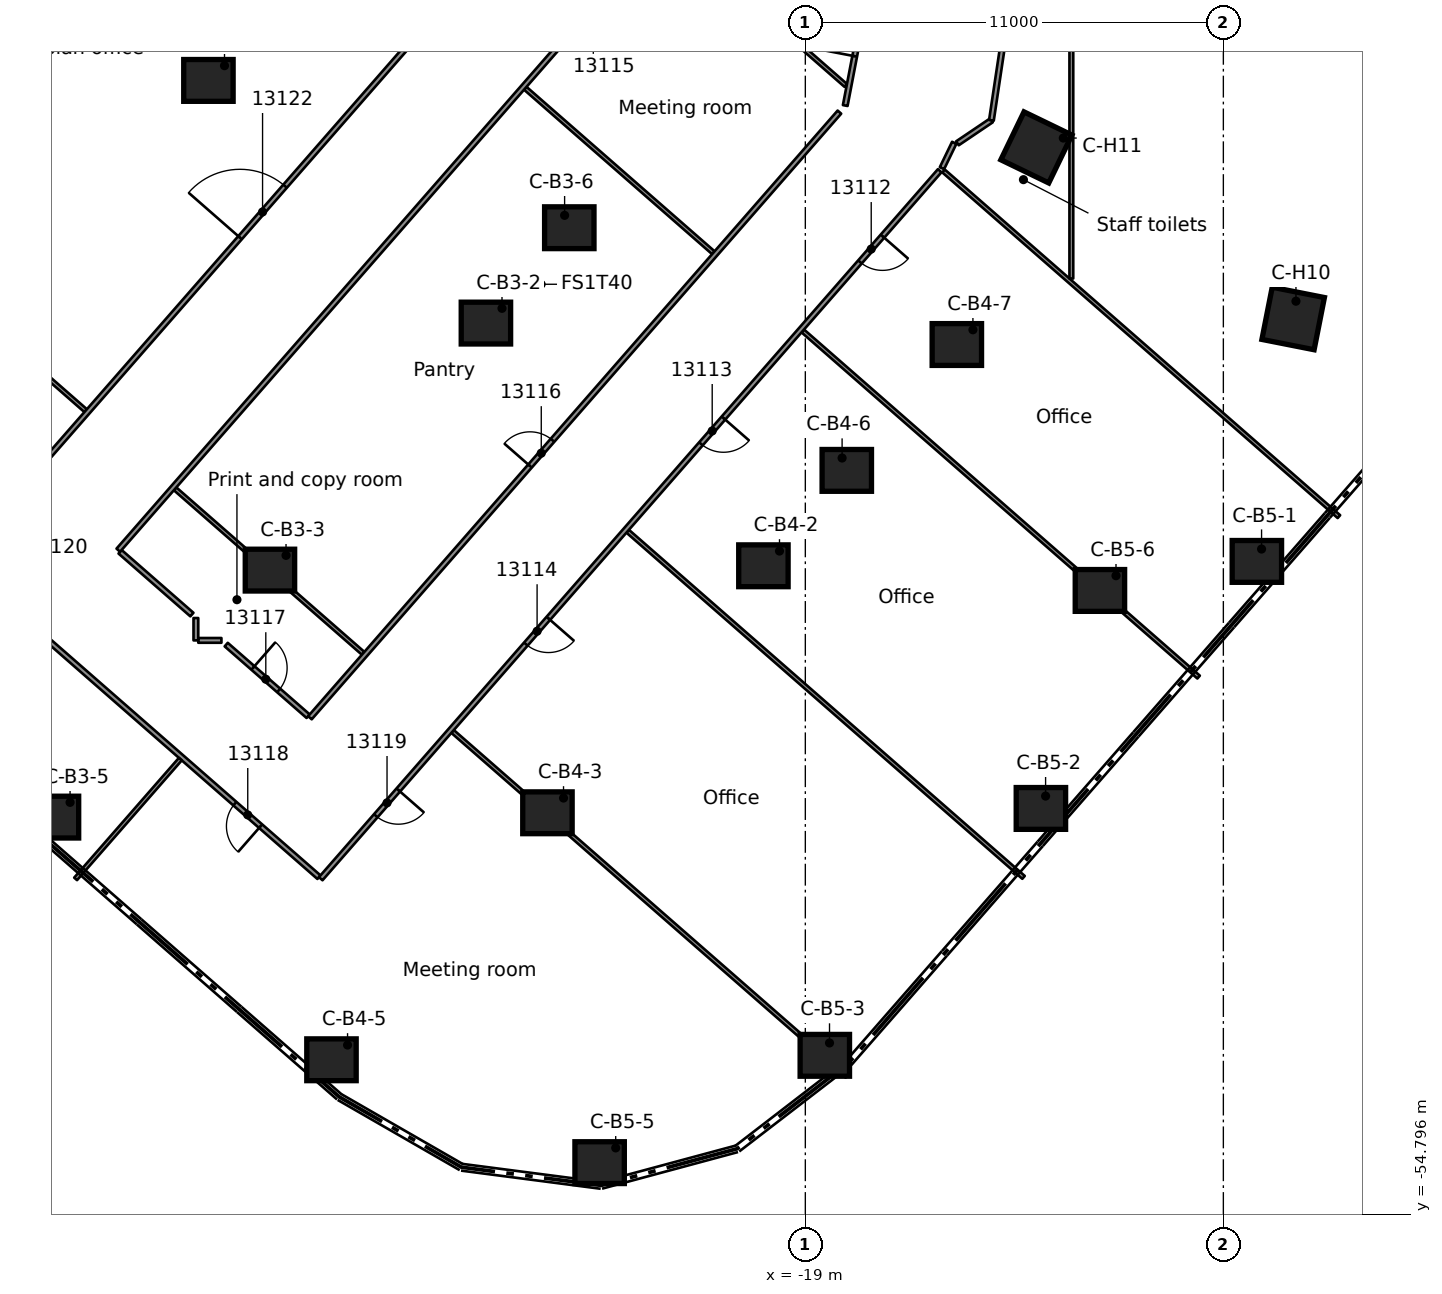
"""IFC4 building model, lengths in metres.
Left out: names, types, materials, properties, quantities, classifications, styles, units other than length and angle.
Written with IfcOpenShell. Run it as: python <this file> out.ifc"""

import sys

from ifc_helpers import new_model, si_unit, direction, frame, frame_2d, origin, origin_2d, place, context, subcontext, project, spatial, rectangle, extrude, element, fill, save


model = new_model("IFC4")
c1 = context("Model", 3, precision=1e-05, world=origin(), true_north=direction((0.0, 1.0)))
c2 = subcontext(c1, "Body", "Model", "MODEL_VIEW")
j1 = project(units=[si_unit("LENGTHUNIT", "METRE"), si_unit("PLANEANGLEUNIT", "RADIAN")], contexts=[c1])
p1 = place(None, origin())
s1 = spatial("IfcSite", under=j1, at=p1, CompositionType="ELEMENT")
p2 = place(p1, origin())
s2 = spatial("IfcBuilding", under=s1, at=p2, CompositionType="ELEMENT")
p3 = place(p2, frame((0.0, 0.0, 62.3)))
s3 = spatial("IfcBuildingStorey", under=s2, at=p3, CompositionType="ELEMENT", Elevation=62.3)
for number, where, z_axis, x_axis in (
    (1, (-34.707, -24.956, 0.0), (0.0, 0.0, 1.0), (1.0, 0.0, 0.0)),
    (2, (-27.405, -31.341, 0.0), (0.0, 0.0, 1.0), (1.0, 0.0, 0.0)),
    (3, (-33.088, -37.841, 0.0), (0.0, 0.0, 1.0), (1.0, 0.0, 0.0)),
    (4, (-38.771, -44.34, 0.0), (0.0, 0.0, 1.0), (1.0, 0.0, 0.0)),
    (5, (-25.211, -28.832, 0.0), (0.0, 0.0, 1.0), (1.0, 0.0, 0.0)),
    (6, (-20.103, -37.727, 0.0), (0.0, 0.0, 1.0), (1.0, 0.0, 0.0)),
    (7, (-25.786, -44.226, 0.0), (0.0, 0.0, 1.0), (1.0, 0.0, 0.0)),
    (8, (-31.469, -50.725, 0.0), (0.0, 0.0, 1.0), (1.0, 0.0, 0.0)),
    (9, (-17.909, -35.217, 0.0), (0.0, 0.0, 1.0), (1.0, 0.0, 0.0)),
    (10, (-15.013, -31.905, 0.0), (0.0, 0.0, 1.0), (1.0, 0.0, 0.0)),
    (11, (-7.118, -37.612, 0.0), (0.0, 0.0, 1.0), (1.0, 0.0, 0.0)),
    (12, (-12.801, -44.112, 0.0), (0.0, 0.0, 1.0), (1.0, 0.0, 0.0)),
    (13, (-18.487, -50.608, 0.0), (0.0, 0.0, 1.0), (1.0, 0.0, 0.0)),
    (14, (-24.413, -53.432, 0.0), (0.0, 0.0, 1.0), (1.0, 0.0, 0.0)),
    (15, (-11.248, -38.376, 0.0), (0.0, 0.0, 1.0), (1.0, 0.0, 0.0)),
):
    element("IfcColumn", number, at=place(p3, frame(where, z_axis=z_axis, x_axis=x_axis)), inside=s3, PredefinedType="COLUMN", context=c2, shape_type="SweptSolid", body=[
        extrude(rectangle(XDim=1.3, YDim=1.1, at=origin_2d()), origin(), (0.0, 0.0, 1.0), 3.5),
    ])
for number, where, z_axis, x_axis in (
    (16, (-6.163, -31.22, 0.0), (0.0, 0.0, 1.0), (-0.194, -0.981, 0.0)),
    (17, (-12.92, -26.719, 0.0), (0.0, 0.0, 1.0), (-0.435, -0.9, 0.0)),
):
    element("IfcColumn", number, at=place(p3, frame(where, z_axis=z_axis, x_axis=x_axis)), inside=s3, PredefinedType="COLUMN", context=c2, shape_type="SweptSolid", body=[
        extrude(rectangle(XDim=1.4, YDim=1.4, at=origin_2d()), origin(), (0.0, 0.0, 1.0), 3.5),
    ])
p4 = place(p3, frame((-31.798, -45.921, 0.0), z_axis=(0.0, 0.0, 1.0), x_axis=(-0.752771196542, 0.658282253792, 0.0)))
e18 = element("IfcWall", 18, at=p4, inside=s3, PredefinedType="PARTITIONING", context=c2, shape_type="SweptSolid", body=[
    extrude(rectangle(XDim=9.64, YDim=0.125, at=frame_2d((4.82, 0.0))), origin(), (0.0, 0.0, 1.0), 3.08),
])
p5 = place(p4, frame((2.04, 0.0, 0.0)))
e19 = element("IfcOpeningElement", 19, at=p5, cuts=e18, PredefinedType="OPENING", context=c2, shape_type="SweptSolid", body=[
    extrude(rectangle(XDim=0.9, YDim=2.1, at=frame_2d((0.45, 1.05))), frame((0.0, 0.073, 0.0), z_axis=(0.0, -1.0, 0.0), x_axis=(1.0, 0.0, 0.0)), (0.0, 0.0, 1.0), 0.145),
])
p6 = place(p3, frame((-37.032, -37.358, 0.0), z_axis=(0.0, 0.0, 1.0), x_axis=(0.752691127314, -0.658373804812, 0.0)))
e20 = element("IfcWall", 20, at=p6, inside=s3, PredefinedType="PARTITIONING", context=c2, shape_type="SweptSolid", body=[
    extrude(rectangle(XDim=2.511, YDim=0.125, at=frame_2d((1.255, 0.0))), origin(), (0.0, 0.0, 1.0), 3.08),
])
p7 = place(p3, frame((-34.239, -39.801, 0.0), z_axis=(0.0, 0.0, 1.0), x_axis=(0.753004386547, -0.658015496657, 0.0)))
e21 = element("IfcWall", 21, at=p7, inside=s3, PredefinedType="PARTITIONING", context=c2, shape_type="SweptSolid", body=[
    extrude(rectangle(XDim=2.863, YDim=0.125, at=frame_2d((1.432, 0.0))), origin(), (0.0, 0.0, 1.0), 3.08),
])
p8 = place(p7, frame((0.934, 0.0, 0.0)))
e22 = element("IfcOpeningElement", 22, at=p8, cuts=e21, PredefinedType="OPENING", context=c2, shape_type="SweptSolid", body=[
    extrude(rectangle(XDim=0.9, YDim=2.1, at=frame_2d((0.45, 1.05))), frame((0.0, 0.073, 0.0), z_axis=(0.0, -1.0, 0.0), x_axis=(1.0, 0.0, 0.0)), (0.0, 0.0, 1.0), 0.145),
])
p9 = place(p3, frame((-48.313, -24.572, 0.0), z_axis=(0.0, 0.0, 1.0), x_axis=(0.75276101301, -0.658293898872, 0.0)))
e23 = element("IfcWall", 23, at=p9, inside=s3, PredefinedType="PARTITIONING", context=c2, shape_type="SweptSolid", body=[
    extrude(rectangle(XDim=13.783, YDim=0.1, at=frame_2d((6.891, 0.0))), origin(), (0.0, 0.0, 1.0), 3.08),
])
p10 = place(p3, frame((-35.584, -35.702, 0.0), z_axis=(0.0, 0.0, 1.0), x_axis=(0.75268021229, -0.658386283292, 0.0)))
e24 = element("IfcWall", 24, at=p10, inside=s3, PredefinedType="PARTITIONING", context=c2, shape_type="SweptSolid", body=[
    extrude(rectangle(XDim=6.574, YDim=0.1, at=frame_2d((3.287, 0.0))), origin(), (0.0, 0.0, 1.0), 3.08),
])
p11 = place(p3, frame((-28.282, -42.087, 0.0), z_axis=(0.0, 0.0, 1.0), x_axis=(0.752796124803, -0.658253746272, 0.0)))
e25 = element("IfcWall", 25, at=p11, inside=s3, PredefinedType="PARTITIONING", context=c2, shape_type="SweptSolid", body=[
    extrude(rectangle(XDim=13.782, YDim=0.1, at=frame_2d((6.891, 0.0))), origin(), (0.0, 0.0, 1.0), 3.08),
])
p12 = place(p3, frame((-23.675, -36.818, 0.0), z_axis=(0.0, 0.0, 1.0), x_axis=(0.752825840036, -0.65821976161, 0.0)))
e26 = element("IfcWall", 26, at=p12, inside=s3, PredefinedType="PARTITIONING", context=c2, shape_type="SweptSolid", body=[
    extrude(rectangle(XDim=13.837, YDim=0.1, at=frame_2d((6.918, 0.0))), origin(), (0.0, 0.0, 1.0), 3.08),
])
p13 = place(p3, frame((-26.369, -25.163, 0.0), z_axis=(0.0, 0.0, 1.0), x_axis=(0.752836606275, -0.658207447734, 0.0)))
e27 = element("IfcWall", 27, at=p13, inside=s3, PredefinedType="PARTITIONING", context=c2, shape_type="SweptSolid", body=[
    extrude(rectangle(XDim=6.574, YDim=0.1, at=frame_2d((3.287, 0.0))), origin(), (0.0, 0.0, 1.0), 3.08),
])
p14 = place(p3, frame((-19.067, -31.548, 0.0), z_axis=(0.0, 0.0, 1.0), x_axis=(0.752795260656, -0.658254734531, 0.0)))
e28 = element("IfcWall", 28, at=p14, inside=s3, PredefinedType="PARTITIONING", context=c2, shape_type="SweptSolid", body=[
    extrude(rectangle(XDim=13.836, YDim=0.1, at=frame_2d((6.918, 0.0))), origin(), (0.0, 0.0, 1.0), 3.08),
])
p15 = place(p3, frame((-22.678, -20.942, 0.0), z_axis=(0.0, 0.0, 1.0), x_axis=(0.752838405923, -0.658205389349, 0.0)))
e29 = element("IfcWall", 29, at=p15, inside=s3, PredefinedType="PARTITIONING", context=c2, shape_type="SweptSolid", body=[
    extrude(rectangle(XDim=6.297, YDim=0.1, at=frame_2d((3.149, 0.0))), origin(), (0.0, 0.0, 1.0), 3.08),
])
p16 = place(p3, frame((-15.364, -27.338, 0.0), z_axis=(0.0, 0.0, 1.0), x_axis=(0.752870986554, -0.658168122599, 0.0)))
e30 = element("IfcWall", 30, at=p16, inside=s3, PredefinedType="PARTITIONING", context=c2, shape_type="SweptSolid", body=[
    extrude(rectangle(XDim=13.821, YDim=0.1, at=frame_2d((6.91, 0.0))), origin(), (0.0, 0.0, 1.0), 3.08),
])
p17 = place(p3, frame((-14.998, -26.611, 0.0), z_axis=(0.0, 0.0, 1.0), x_axis=(0.828906337017, 0.559387418926, 0.0)))
e31 = element("IfcWall", 31, at=p17, inside=s3, PredefinedType="PARTITIONING", context=c2, shape_type="SweptSolid", body=[
    extrude(rectangle(XDim=1.08, YDim=0.125, at=frame_2d((0.54, 0.0))), origin(), (0.0, 0.0, 1.0), 3.08),
])
p18 = place(p3, frame((-34.974, -39.69, 0.0), z_axis=(0.0, 0.0, 1.0), x_axis=(1.0, 0.0, 0.0)))
e32 = element("IfcWall", 32, at=p18, inside=s3, PredefinedType="PARTITIONING", context=c2, shape_type="SweptSolid", body=[
    extrude(rectangle(XDim=0.609, YDim=0.125, at=frame_2d((0.305, 0.0))), origin(), (0.0, 0.0, 1.0), 3.08),
])
p19 = place(p3, frame((-15.464, -27.332, 0.0), z_axis=(0.0, 0.0, 1.0), x_axis=(-0.658219577617, -0.752826000907, 0.0)))
e33 = element("IfcWall", 33, at=p19, inside=s3, PredefinedType="PARTITIONING", context=c2, shape_type="SweptSolid", body=[
    extrude(rectangle(XDim=24.745, YDim=0.125, at=frame_2d((12.373, 0.0))), origin(), (0.0, 0.0, 1.0), 3.08),
])
p20 = place(p19, frame((2.288, 0.0, 0.0)))
e34 = element("IfcOpeningElement", 34, at=p20, cuts=e33, PredefinedType="OPENING", context=c2, shape_type="SweptSolid", body=[
    extrude(rectangle(XDim=0.9, YDim=2.1, at=frame_2d((0.45, 1.05))), frame((0.0, 0.073, 0.0), z_axis=(0.0, -1.0, 0.0), x_axis=(1.0, 0.0, 0.0)), (0.0, 0.0, 1.0), 0.145),
])
p21 = place(p19, frame((8.645, 0.0, 0.0)))
e35 = element("IfcOpeningElement", 35, at=p21, cuts=e33, PredefinedType="OPENING", context=c2, shape_type="SweptSolid", body=[
    extrude(rectangle(XDim=0.9, YDim=2.1, at=frame_2d((0.45, 1.05))), frame((0.0, 0.073, 0.0), z_axis=(0.0, -1.0, 0.0), x_axis=(1.0, 0.0, 0.0)), (0.0, 0.0, 1.0), 0.145),
])
p22 = place(p19, frame((15.646, 0.0, 0.0)))
e36 = element("IfcOpeningElement", 36, at=p22, cuts=e33, PredefinedType="OPENING", context=c2, shape_type="SweptSolid", body=[
    extrude(rectangle(XDim=0.9, YDim=2.1, at=frame_2d((0.45, 1.05))), frame((0.0, 0.073, 0.0), z_axis=(0.0, -1.0, 0.0), x_axis=(1.0, 0.0, 0.0)), (0.0, 0.0, 1.0), 0.145),
])
p23 = place(p19, frame((21.645, 0.0, 0.0)))
e37 = element("IfcOpeningElement", 37, at=p23, cuts=e33, PredefinedType="OPENING", context=c2, shape_type="SweptSolid", body=[
    extrude(rectangle(XDim=0.9, YDim=2.1, at=frame_2d((0.45, 1.05))), frame((0.0, 0.073, 0.0), z_axis=(0.0, -1.0, 0.0), x_axis=(1.0, 0.0, 0.0)), (0.0, 0.0, 1.0), 0.145),
])
p24 = place(p3, frame((-32.036, -41.726, 0.0), z_axis=(0.0, 0.0, 1.0), x_axis=(0.658205705433, 0.75283812957, 0.0)))
e38 = element("IfcWall", 38, at=p24, inside=s3, PredefinedType="PARTITIONING", context=c2, shape_type="SweptSolid", body=[
    extrude(rectangle(XDim=21.168, YDim=0.125, at=frame_2d((10.584, 0.0))), origin(), (0.0, 0.0, 1.0), 3.08),
])
p25 = place(p24, frame((8.798, 0.0, 0.0)))
e39 = element("IfcOpeningElement", 39, at=p25, cuts=e38, PredefinedType="OPENING", context=c2, shape_type="SweptSolid", body=[
    extrude(rectangle(XDim=0.9, YDim=2.1, at=frame_2d((0.45, 1.05))), frame((0.0, 0.073, 0.0), z_axis=(0.0, -1.0, 0.0), x_axis=(1.0, 0.0, 0.0)), (0.0, 0.0, 1.0), 0.145),
])
p26 = place(p3, frame((-38.202, -45.966, 0.0), z_axis=(0.0, 0.0, 1.0), x_axis=(0.658203200775, 0.752840319384, 0.0)))
e40 = element("IfcWall", 40, at=p26, inside=s3, PredefinedType="PARTITIONING", context=c2, shape_type="SweptSolid", body=[
    extrude(rectangle(XDim=4.187, YDim=0.1, at=frame_2d((2.094, 0.0))), origin(), (0.0, 0.0, 1.0), 3.08),
])
p27 = place(p3, frame((-22.736, -20.913, 0.0), z_axis=(0.0, 0.0, 1.0), x_axis=(-0.658236458127, -0.752811241409, 0.0)))
e41 = element("IfcWall", 41, at=p27, inside=s3, PredefinedType="PARTITIONING", context=c2, shape_type="SweptSolid", body=[
    extrude(rectangle(XDim=21.79, YDim=0.125, at=frame_2d((10.895, 0.0))), origin(), (0.0, 0.0, 1.0), 3.08),
])
p28 = place(p27, frame((2.35, 0.0, 0.0)))
e42 = element("IfcOpeningElement", 42, at=p28, cuts=e41, PredefinedType="OPENING", context=c2, shape_type="SweptSolid", body=[
    extrude(rectangle(XDim=0.9, YDim=2.1, at=frame_2d((0.45, 1.05))), frame((0.0, 0.073, 0.0), z_axis=(0.0, -1.0, 0.0), x_axis=(1.0, 0.0, 0.0)), (0.0, 0.0, 1.0), 0.145),
])
p29 = place(p3, frame((-41.314, -37.6, 0.0), z_axis=(0.0, 0.0, 1.0), x_axis=(0.658340906106, 0.752719902319, 0.0)))
e43 = element("IfcWall", 43, at=p29, inside=s3, PredefinedType="PARTITIONING", context=c2, shape_type="SweptSolid", body=[
    extrude(rectangle(XDim=24.075, YDim=0.125, at=frame_2d((12.038, 0.0))), origin(), (0.0, 0.0, 1.0), 3.08),
])
p30 = place(p29, frame((21.051, 0.0, 0.0)))
e44 = element("IfcOpeningElement", 44, at=p30, cuts=e43, PredefinedType="OPENING", context=c2, shape_type="SweptSolid", body=[
    extrude(rectangle(XDim=1.1, YDim=2.1, at=frame_2d((0.55, 1.05))), frame((0.0, 0.073, 0.0), z_axis=(0.0, -1.0, 0.0), x_axis=(1.0, 0.0, 0.0)), (0.0, 0.0, 1.0), 0.145),
])
p31 = place(p29, frame((11.3, 0.0, 0.0)))
e45 = element("IfcOpeningElement", 45, at=p31, cuts=e43, PredefinedType="OPENING", context=c2, shape_type="SweptSolid", body=[
    extrude(rectangle(XDim=1.8, YDim=2.1, at=frame_2d((0.9, 1.05))), frame((0.0, 0.073, 0.0), z_axis=(0.0, -1.0, 0.0), x_axis=(1.0, 0.0, 0.0)), (0.0, 0.0, 1.0), 0.145),
])
p32 = place(p3, frame((-15.405, -27.266, 0.0), z_axis=(0.0, 0.0, 1.0), x_axis=(0.435199770088, 0.900333915897, 0.0)))
e46 = element("IfcWall", 46, at=p32, inside=s3, PredefinedType="PARTITIONING", context=c2, shape_type="SweptSolid", body=[
    extrude(rectangle(XDim=0.742, YDim=0.125, at=frame_2d((0.371, 0.0))), origin(), (0.0, 0.0, 1.0), 3.08),
])
p33 = place(p3, frame((-17.95, -25.617, 0.0), z_axis=(0.0, 0.0, 1.0), x_axis=(0.188644670049, 0.982045410591, 0.0)))
e47 = element("IfcWall", 47, at=p33, inside=s3, PredefinedType="PARTITIONING", context=c2, shape_type="SweptSolid", body=[
    extrude(rectangle(XDim=3.037, YDim=0.125, at=frame_2d((1.519, 0.0))), origin(), (0.0, 0.0, 1.0), 3.08),
])
p34 = place(p33, frame((1.322, 0.0, 0.0)))
e48 = element("IfcOpeningElement", 48, at=p34, cuts=e47, PredefinedType="OPENING", context=c2, shape_type="SweptSolid", body=[
    extrude(rectangle(XDim=0.9, YDim=2.1, at=frame_2d((0.45, 1.05))), frame((0.0, 0.073, 0.0), z_axis=(0.0, -1.0, 0.0), x_axis=(1.0, 0.0, 0.0)), (0.0, 0.0, 1.0), 0.145),
])
p35 = place(p3, frame((-12.458, -15.051, 0.0), z_axis=(0.0, 0.0, 1.0), x_axis=(-0.148482692609, -0.988915006457, 0.0)))
e49 = element("IfcWall", 49, at=p35, inside=s3, PredefinedType="PARTITIONING", context=c2, shape_type="SweptSolid", body=[
    extrude(rectangle(XDim=11.079, YDim=0.125, at=frame_2d((5.54, 0.0))), origin(), (0.0, 0.0, 1.0), 3.08),
])
p36 = place(p35, frame((4.964, 0.0, 0.0)))
e50 = element("IfcOpeningElement", 50, at=p36, cuts=e49, PredefinedType="OPENING", context=c2, shape_type="SweptSolid", body=[
    extrude(rectangle(XDim=0.9, YDim=2.1, at=frame_2d((0.45, 1.05))), frame((0.0, 0.073, 0.0), z_axis=(0.0, -1.0, 0.0), x_axis=(1.0, 0.0, 0.0)), (0.0, 0.0, 1.0), 0.145),
])
p37 = place(p3, frame((-12.0, -30.169, 0.0), z_axis=(0.0, 0.0, 1.0), x_axis=(0.0, 1.0, 0.0)))
e51 = element("IfcWall", 51, at=p37, inside=s3, PredefinedType="PARTITIONING", context=c2, shape_type="SweptSolid", body=[
    extrude(rectangle(XDim=15.055, YDim=0.1, at=frame_2d((7.527, 0.0))), origin(), (0.0, 0.0, 1.0), 3.08),
])
p38 = place(p3, frame((-35.037, -39.69, 0.0), z_axis=(0.0, 0.0, 1.0), x_axis=(0.0, 1.0, 0.0)))
e52 = element("IfcWall", 52, at=p38, inside=s3, PredefinedType="PARTITIONING", context=c2, shape_type="SweptSolid", body=[
    extrude(rectangle(XDim=0.588, YDim=0.125, at=frame_2d((0.294, 0.0))), origin(), (0.0, 0.0, 1.0), 3.08),
])
p39 = place(p20, origin())
e53 = element("IfcDoor", 53, at=p39, inside=s3, OperationType="SINGLE_SWING_LEFT", PredefinedType="DOOR", context=c2, shape_type="SweptSolid", body=[
    extrude(rectangle(XDim=0.9, YDim=2.1, at=frame_2d((0.45, 1.05))), frame((0.0, 0.025, 0.0), z_axis=(0.0, -1.0, 0.0), x_axis=(1.0, 0.0, 0.0)), (0.0, 0.0, 1.0), 0.05),
])
fill(e34, e53)
p40 = place(p21, origin())
e54 = element("IfcDoor", 54, at=p40, inside=s3, OperationType="SINGLE_SWING_LEFT", PredefinedType="DOOR", context=c2, shape_type="SweptSolid", body=[
    extrude(rectangle(XDim=0.9, YDim=2.1, at=frame_2d((0.45, 1.05))), frame((0.0, 0.025, 0.0), z_axis=(0.0, -1.0, 0.0), x_axis=(1.0, 0.0, 0.0)), (0.0, 0.0, 1.0), 0.05),
])
fill(e35, e54)
p41 = place(p22, origin())
e55 = element("IfcDoor", 55, at=p41, inside=s3, OperationType="SINGLE_SWING_RIGHT", PredefinedType="DOOR", context=c2, shape_type="SweptSolid", body=[
    extrude(rectangle(XDim=0.9, YDim=2.1, at=frame_2d((0.45, 1.05))), frame((0.0, 0.025, 0.0), z_axis=(0.0, -1.0, 0.0), x_axis=(1.0, 0.0, 0.0)), (0.0, 0.0, 1.0), 0.05),
])
fill(e36, e55)
p42 = place(p25, origin())
e56 = element("IfcDoor", 56, at=p42, inside=s3, OperationType="SINGLE_SWING_LEFT", PredefinedType="DOOR", context=c2, shape_type="SweptSolid", body=[
    extrude(rectangle(XDim=0.9, YDim=2.1, at=frame_2d((0.45, 1.05))), frame((0.0, 0.025, 0.0), z_axis=(0.0, -1.0, 0.0), x_axis=(1.0, 0.0, 0.0)), (0.0, 0.0, 1.0), 0.05),
])
fill(e39, e56)
p43 = place(p8, origin())
e57 = element("IfcDoor", 57, at=p43, inside=s3, OperationType="SINGLE_SWING_LEFT", PredefinedType="DOOR", context=c2, shape_type="SweptSolid", body=[
    extrude(rectangle(XDim=0.9, YDim=2.1, at=frame_2d((0.45, 1.05))), frame((0.0, 0.025, 0.0), z_axis=(0.0, -1.0, 0.0), x_axis=(1.0, 0.0, 0.0)), (0.0, 0.0, 1.0), 0.05),
])
fill(e22, e57)
p44 = place(p5, origin())
e58 = element("IfcDoor", 58, at=p44, inside=s3, OperationType="SINGLE_SWING_LEFT", PredefinedType="DOOR", context=c2, shape_type="SweptSolid", body=[
    extrude(rectangle(XDim=0.9, YDim=2.1, at=frame_2d((0.45, 1.05))), frame((0.0, 0.025, 0.0), z_axis=(0.0, -1.0, 0.0), x_axis=(1.0, 0.0, 0.0)), (0.0, 0.0, 1.0), 0.05),
])
fill(e19, e58)
p45 = place(p23, origin())
e59 = element("IfcDoor", 59, at=p45, inside=s3, OperationType="SINGLE_SWING_RIGHT", PredefinedType="DOOR", context=c2, shape_type="SweptSolid", body=[
    extrude(rectangle(XDim=0.9, YDim=2.1, at=frame_2d((0.45, 1.05))), frame((0.0, 0.025, 0.0), z_axis=(0.0, -1.0, 0.0), x_axis=(1.0, 0.0, 0.0)), (0.0, 0.0, 1.0), 0.05),
])
fill(e37, e59)
p46 = place(p31, origin())
e60 = element("IfcDoor", 60, at=p46, inside=s3, OperationType="DOUBLE_DOOR_SINGLE_SWING", PredefinedType="DOOR", context=c2, shape_type="SweptSolid", body=[
    extrude(rectangle(XDim=1.8, YDim=2.1, at=frame_2d((0.9, 1.05))), frame((0.0, 0.025, 0.0), z_axis=(0.0, -1.0, 0.0), x_axis=(1.0, 0.0, 0.0)), (0.0, 0.0, 1.0), 0.05),
])
fill(e45, e60)
p47 = place(p34, origin())
e61 = element("IfcDoor", 61, at=p47, inside=s3, OperationType="SINGLE_SWING_RIGHT", PredefinedType="DOOR", context=c2, shape_type="SweptSolid", body=[
    extrude(rectangle(XDim=0.9, YDim=2.1, at=frame_2d((0.45, 1.05))), frame((0.0, 0.025, 0.0), z_axis=(0.0, -1.0, 0.0), x_axis=(1.0, 0.0, 0.0)), (0.0, 0.0, 1.0), 0.05),
])
fill(e48, e61)
save(model, sys.argv[1])
